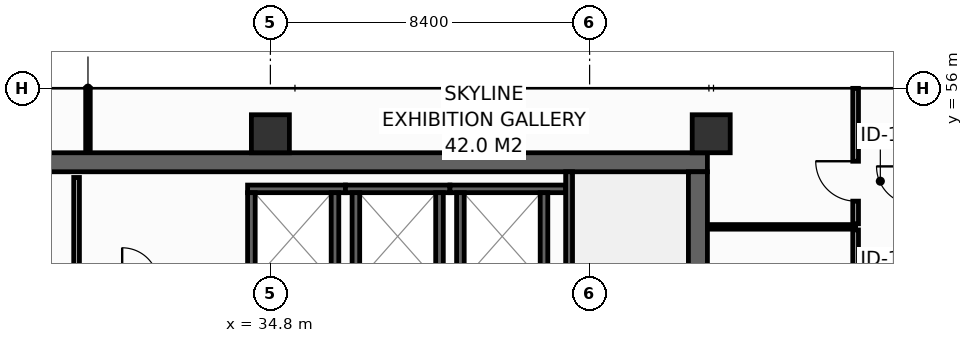
"""IFC4 building model, lengths in metres.
Left out: names, types, materials, properties, quantities, classifications, styles, units other than length and angle.
Written with IfcOpenShell. Run it as: python <this file> out.ifc"""

import sys

from ifc_helpers import new_model, si_unit, direction, frame, frame_2d, origin, origin_2d, place, context, subcontext, project, spatial, rectangle, hollow_rectangle, extrude, element, fill, save


model = new_model("IFC4")
c1 = context("Model", 3, precision=1e-05, world=origin(), true_north=direction((0.0, 1.0)))
c2 = subcontext(c1, "Body", "Model", "MODEL_VIEW")
j1 = project(units=[si_unit("LENGTHUNIT", "METRE"), si_unit("PLANEANGLEUNIT", "RADIAN")], contexts=[c1])
p1 = place(None, origin())
s1 = spatial("IfcSite", under=j1, at=p1, CompositionType="ELEMENT")
p2 = place(p1, origin())
s2 = spatial("IfcBuilding", under=s1, at=p2, CompositionType="ELEMENT")
p3 = place(p2, frame((0.0, 0.0, 152.4)))
s3 = spatial("IfcBuildingStorey", under=s2, at=p3, CompositionType="ELEMENT", Elevation=152.4)
p4 = place(p3, frame((13.6, 54.05, 0.0), z_axis=(0.0, 0.0, 1.0), x_axis=(1.0, 0.0, 0.0)))
e1 = element("IfcWall", 1, at=p4, inside=s3, PredefinedType="SHEAR", context=c2, shape_type="SweptSolid", body=[
    extrude(rectangle(XDim=32.7, YDim=0.5, at=frame_2d((16.35, 0.0))), origin(), (0.0, 0.0, 1.0), 3.55),
])
p5 = place(p3, frame((46.05, 43.4, 0.0), z_axis=(0.0, 0.0, 1.0), x_axis=(0.0, 1.0, 0.0)))
e2 = element("IfcWall", 2, at=p5, inside=s3, PredefinedType="SHEAR", context=c2, shape_type="SweptSolid", body=[
    extrude(rectangle(XDim=10.4, YDim=0.5, at=frame_2d((5.2, 0.0))), origin(), (0.0, 0.0, 1.0), 3.55),
])
for number, where, z_axis, x_axis in (
    (3, (34.8, 54.8, 0.0), (0.0, 0.0, 1.0), (1.0, 0.0, 0.0)),
    (4, (46.4, 54.8, 0.0), (0.0, 0.0, 1.0), (1.0, 0.0, 0.0)),
):
    element("IfcColumn", number, at=place(p3, frame(where, z_axis=z_axis, x_axis=x_axis)), inside=s3, PredefinedType="COLUMN", context=c2, shape_type="SweptSolid", body=[
        extrude(hollow_rectangle(XDim=1.0, YDim=1.0, WallThickness=0.045, at=origin_2d()), origin(), (0.0, 0.0, 1.0), 3.8),
    ])
p6 = place(p3, frame((34.2, 53.35, 0.0), z_axis=(0.0, 0.0, 1.0), x_axis=(1.0, 0.0, 0.0)))
e5 = element("IfcWall", 5, at=p6, inside=s3, PredefinedType="SHEAR", context=c2, shape_type="SweptSolid", body=[
    extrude(rectangle(XDim=2.575, YDim=0.2, at=frame_2d((1.288, 0.0))), origin(), (0.0, 0.0, 1.0), 3.55),
])
for number, where, z_axis, x_axis in (
    (6, (34.3, 50.95, 0.0), (0.0, 0.0, 1.0), (0.0, 1.0, 0.0)),
    (7, (36.5, 50.95, 0.0), (0.0, 0.0, 1.0), (0.0, 1.0, 0.0)),
):
    element("IfcWall", number, at=place(p3, frame(where, z_axis=z_axis, x_axis=x_axis)), inside=s3, PredefinedType="SHEAR", context=c2, shape_type="SweptSolid", body=[
        extrude(rectangle(XDim=2.3, YDim=0.2, at=frame_2d((1.15, 0.0))), origin(), (0.0, 0.0, 1.0), 3.55),
    ])
p7 = place(p3, frame((36.775, 53.35, 0.0), z_axis=(0.0, 0.0, 1.0), x_axis=(1.0, 0.0, 0.0)))
e8 = element("IfcWall", 8, at=p7, inside=s3, PredefinedType="SHEAR", context=c2, shape_type="SweptSolid", body=[
    extrude(rectangle(XDim=2.75, YDim=0.2, at=frame_2d((1.375, 0.0))), origin(), (0.0, 0.0, 1.0), 3.55),
])
for number, where, z_axis, x_axis in (
    (9, (37.05, 50.95, 0.0), (0.0, 0.0, 1.0), (0.0, 1.0, 0.0)),
    (10, (39.25, 50.95, 0.0), (0.0, 0.0, 1.0), (0.0, 1.0, 0.0)),
):
    element("IfcWall", number, at=place(p3, frame(where, z_axis=z_axis, x_axis=x_axis)), inside=s3, PredefinedType="SHEAR", context=c2, shape_type="SweptSolid", body=[
        extrude(rectangle(XDim=2.3, YDim=0.2, at=frame_2d((1.15, 0.0))), origin(), (0.0, 0.0, 1.0), 3.55),
    ])
p8 = place(p3, frame((39.525, 53.35, 0.0), z_axis=(0.0, 0.0, 1.0), x_axis=(1.0, 0.0, 0.0)))
e11 = element("IfcWall", 11, at=p8, inside=s3, PredefinedType="SHEAR", context=c2, shape_type="SweptSolid", body=[
    extrude(rectangle(XDim=3.045, YDim=0.2, at=frame_2d((1.522, 0.0))), origin(), (0.0, 0.0, 1.0), 3.55),
])
for number, where, z_axis, x_axis in (
    (12, (39.8, 50.95, 0.0), (0.0, 0.0, 1.0), (0.0, 1.0, 0.0)),
    (13, (42.0, 50.95, 0.0), (0.0, 0.0, 1.0), (0.0, 1.0, 0.0)),
):
    element("IfcWall", number, at=place(p3, frame(where, z_axis=z_axis, x_axis=x_axis)), inside=s3, PredefinedType="SHEAR", context=c2, shape_type="SweptSolid", body=[
        extrude(rectangle(XDim=2.3, YDim=0.2, at=frame_2d((1.15, 0.0))), origin(), (0.0, 0.0, 1.0), 3.55),
    ])
p9 = place(p3, frame((42.66, 53.8, 0.0), z_axis=(0.0, 0.0, 1.0), x_axis=(0.0, -1.0, 0.0)))
e14 = element("IfcWall", 14, at=p9, inside=s3, PredefinedType="SHEAR", context=c2, shape_type="SweptSolid", body=[
    extrude(rectangle(XDim=10.4, YDim=0.18, at=frame_2d((5.2, 0.0))), origin(), (0.0, 0.0, 1.0), 3.55),
])
p10 = place(p9, frame((8.99, 0.0, 0.0)))
e15 = element("IfcOpeningElement", 15, at=p10, cuts=e14, PredefinedType="OPENING", context=c2, shape_type="SweptSolid", body=[
    extrude(rectangle(XDim=1.1, YDim=2.15, at=frame_2d((0.55, 1.075))), frame((0.0, 0.1, 0.0), z_axis=(0.0, -1.0, 0.0), x_axis=(1.0, 0.0, 0.0)), (0.0, 0.0, 1.0), 0.2),
])
p11 = place(p3, frame((29.7, 50.95, 0.0), z_axis=(0.0, 0.0, 1.0), x_axis=(0.0, 1.0, 0.0)))
e16 = element("IfcWall", 16, at=p11, inside=s3, PredefinedType="PARTITIONING", context=c2, shape_type="SweptSolid", body=[
    extrude(rectangle(XDim=2.7, YDim=0.15, at=frame_2d((1.35, 0.0))), origin(), (0.0, 0.0, 1.0), 3.55),
])
p12 = place(p3, frame((46.32, 52.35, 0.0), z_axis=(0.0, 0.0, 1.0), x_axis=(1.0, 0.0, 0.0)))
e17 = element("IfcWall", 17, at=p12, inside=s3, PredefinedType="PARTITIONING", context=c2, shape_type="SweptSolid", body=[
    extrude(rectangle(XDim=3.88, YDim=0.12, at=frame_2d((1.94, 0.0))), origin(), (0.0, 0.0, 1.0), 3.55),
])
p13 = place(p3, frame((30.0, 54.32, 0.0), z_axis=(0.0, 0.0, 1.0), x_axis=(0.0, 1.0, 0.0)))
e18 = element("IfcWall", 18, at=p13, inside=s3, PredefinedType="PARTITIONING", context=c2, shape_type="SweptSolid", body=[
    extrude(rectangle(XDim=1.675, YDim=0.12, at=frame_2d((0.837, 0.0))), origin(), (0.0, 0.0, 1.0), 2.935),
])
p14 = place(p3, frame((50.2, 48.29, 0.0), z_axis=(0.0, 0.0, 1.0), x_axis=(0.0, 1.0, 0.0)))
e19 = element("IfcWall", 19, at=p14, inside=s3, PredefinedType="PARTITIONING", context=c2, shape_type="SweptSolid", body=[
    extrude(rectangle(XDim=3.98, YDim=0.15, at=frame_2d((1.99, 0.0))), origin(), (0.0, 0.0, 1.0), 3.55),
])
p15 = place(p14, frame((1.465, 0.0, 0.0)))
e20 = element("IfcOpeningElement", 20, at=p15, cuts=e19, PredefinedType="OPENING", context=c2, shape_type="SweptSolid", body=[
    extrude(rectangle(XDim=1.05, YDim=2.15, at=frame_2d((0.525, 1.075))), frame((0.0, 0.085, 0.0), z_axis=(0.0, -1.0, 0.0), x_axis=(1.0, 0.0, 0.0)), (0.0, 0.0, 1.0), 0.17),
])
p16 = place(p3, frame((50.2, 52.43, 0.0), z_axis=(0.0, 0.0, 1.0), x_axis=(0.0, 1.0, 0.0)))
e21 = element("IfcWall", 21, at=p16, inside=s3, PredefinedType="PARTITIONING", context=c2, shape_type="SweptSolid", body=[
    extrude(rectangle(XDim=3.565, YDim=0.15, at=frame_2d((1.783, 0.0))), origin(), (0.0, 0.0, 1.0), 2.935),
])
p17 = place(p16, frame((0.597, 0.0, 0.0)))
e22 = element("IfcOpeningElement", 22, at=p17, cuts=e21, PredefinedType="OPENING", context=c2, shape_type="SweptSolid", body=[
    extrude(rectangle(XDim=1.05, YDim=2.15, at=frame_2d((0.525, 1.075))), frame((0.0, 0.085, 0.0), z_axis=(0.0, -1.0, 0.0), x_axis=(1.0, 0.0, 0.0)), (0.0, 0.0, 1.0), 0.17),
])
p18 = place(p17, origin())
e23 = element("IfcDoor", 23, at=p18, inside=s3, OperationType="SINGLE_SWING_RIGHT", PredefinedType="DOOR", context=c2, shape_type="SweptSolid", body=[
    extrude(rectangle(XDim=1.05, YDim=2.15, at=frame_2d((0.525, 1.075))), frame((0.0, 0.025, 0.0), z_axis=(0.0, -1.0, 0.0), x_axis=(1.0, 0.0, 0.0)), (0.0, 0.0, 1.0), 0.05),
])
fill(e22, e23)
save(model, sys.argv[1])
